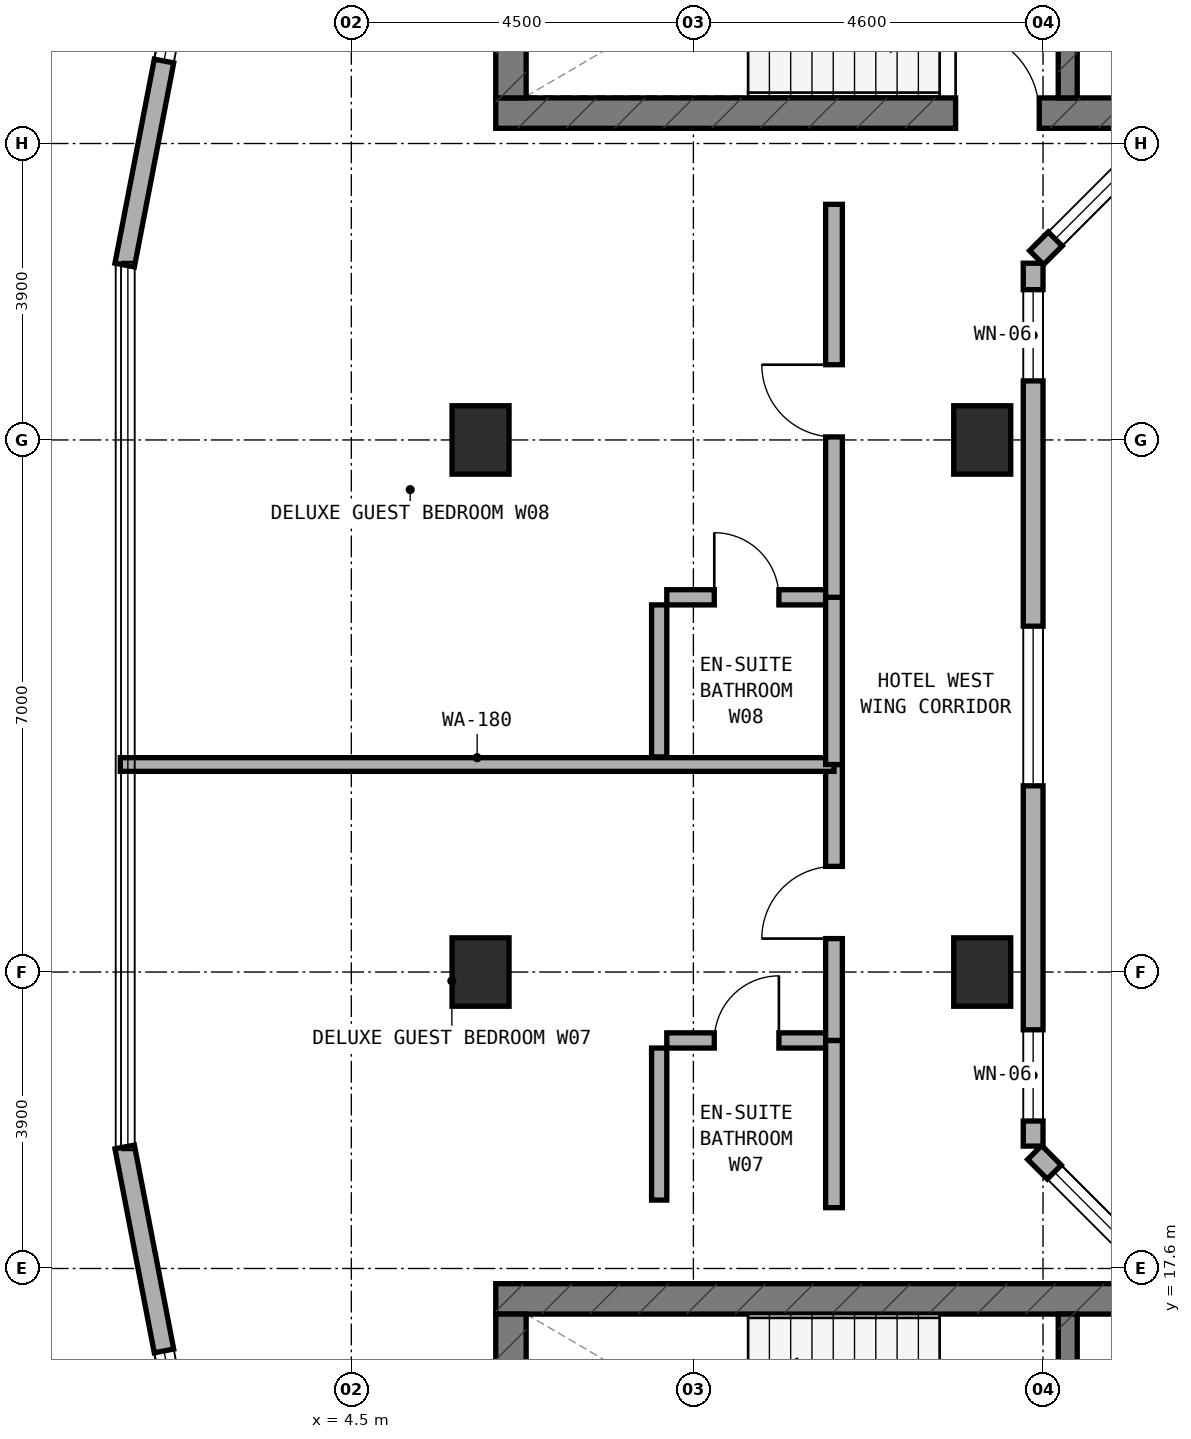
"""IFC4 building model, lengths in metres.
Left out: names, types, materials, properties, quantities, classifications, styles, units other than length and angle.
Written with IfcOpenShell. Run it as: python <this file> out.ifc"""

import sys

from ifc_helpers import new_model, si_unit, direction, frame, frame_2d, origin, origin_2d, place, context, subcontext, project, spatial, rectangle, extrude, element, fill, save


model = new_model("IFC4")
c1 = context("Model", 3, precision=1e-05, world=origin(), true_north=direction((0.0, 1.0)))
c2 = subcontext(c1, "Body", "Model", "MODEL_VIEW")
j1 = project(units=[si_unit("LENGTHUNIT", "METRE"), si_unit("PLANEANGLEUNIT", "RADIAN")], contexts=[c1])
p1 = place(None, origin())
s1 = spatial("IfcSite", under=j1, at=p1, CompositionType="ELEMENT")
p2 = place(p1, origin())
s2 = spatial("IfcBuilding", under=s1, at=p2, CompositionType="ELEMENT")
p3 = place(p2, frame((0.0, 0.0, 181.1)))
s3 = spatial("IfcBuildingStorey", under=s2, at=p3, CompositionType="ELEMENT", Elevation=181.1)
p4 = place(p3, frame((6.4, 32.8, 0.0), z_axis=(0.0, 0.0, 1.0), x_axis=(1.0, 0.0, 0.0)))
e1 = element("IfcWall", 1, at=p4, inside=s3, PredefinedType="SHEAR", context=c2, shape_type="SweptSolid", body=[
    extrude(rectangle(XDim=24.4, YDim=0.4, at=frame_2d((12.2, 0.0))), origin(), (0.0, 0.0, 1.0), 3.6),
])
p5 = place(p4, frame((6.05, 0.0, 0.0)))
e2 = element("IfcOpeningElement", 2, at=p5, cuts=e1, PredefinedType="OPENING", context=c2, shape_type="SweptSolid", body=[
    extrude(rectangle(XDim=1.1, YDim=2.15, at=frame_2d((0.55, 1.075))), frame((0.0, 0.21, 0.0), z_axis=(0.0, -1.0, 0.0), x_axis=(1.0, 0.0, 0.0)), (0.0, 0.0, 1.0), 0.42),
])
p6 = place(p3, frame((6.6, 33.0, 0.0), z_axis=(0.0, 0.0, 1.0), x_axis=(0.0, 1.0, 0.0)))
e3 = element("IfcWall", 3, at=p6, inside=s3, PredefinedType="SHEAR", context=c2, shape_type="SweptSolid", body=[
    extrude(rectangle(XDim=3.16, YDim=0.4, at=frame_2d((1.58, 0.0))), origin(), (0.0, 0.0, 1.0), 3.6),
])
p7 = place(p3, frame((13.925, 33.0, 0.0), z_axis=(0.0, 0.0, 1.0), x_axis=(0.0, 1.0, 0.0)))
e4 = element("IfcWall", 4, at=p7, inside=s3, PredefinedType="STANDARD", context=c2, shape_type="SweptSolid", body=[
    extrude(rectangle(XDim=3.16, YDim=0.25, at=frame_2d((1.58, 0.0))), origin(), (0.0, 0.0, 1.0), 3.32),
])
p8 = place(p7, frame((0.98, 0.0, 0.0)))
e5 = element("IfcOpeningElement", 5, at=p8, cuts=e4, PredefinedType="OPENING", context=c2, shape_type="SweptSolid", body=[
    extrude(rectangle(XDim=1.1, YDim=2.15, at=frame_2d((0.55, 1.075))), frame((0.0, 0.135, 0.0), z_axis=(0.0, -1.0, 0.0), x_axis=(1.0, 0.0, 0.0)), (0.0, 0.0, 1.0), 0.27),
])
p9 = place(p3, frame((6.4, 17.2, 0.0), z_axis=(0.0, 0.0, 1.0), x_axis=(1.0, 0.0, 0.0)))
e6 = element("IfcWall", 6, at=p9, inside=s3, PredefinedType="SHEAR", context=c2, shape_type="SweptSolid", body=[
    extrude(rectangle(XDim=24.4, YDim=0.4, at=frame_2d((12.2, 0.0))), origin(), (0.0, 0.0, 1.0), 3.6),
])
p10 = place(p3, frame((6.6, 13.84, 0.0), z_axis=(0.0, 0.0, 1.0), x_axis=(0.0, 1.0, 0.0)))
e7 = element("IfcWall", 7, at=p10, inside=s3, PredefinedType="SHEAR", context=c2, shape_type="SweptSolid", body=[
    extrude(rectangle(XDim=3.16, YDim=0.4, at=frame_2d((1.58, 0.0))), origin(), (0.0, 0.0, 1.0), 3.6),
])
p11 = place(p3, frame((13.925, 13.84, 0.0), z_axis=(0.0, 0.0, 1.0), x_axis=(0.0, 1.0, 0.0)))
e8 = element("IfcWall", 8, at=p11, inside=s3, PredefinedType="STANDARD", context=c2, shape_type="SweptSolid", body=[
    extrude(rectangle(XDim=3.16, YDim=0.25, at=frame_2d((1.58, 0.0))), origin(), (0.0, 0.0, 1.0), 3.32),
])
p12 = place(p11, frame((0.98, 0.0, 0.0)))
e9 = element("IfcOpeningElement", 9, at=p12, cuts=e8, PredefinedType="OPENING", context=c2, shape_type="SweptSolid", body=[
    extrude(rectangle(XDim=1.1, YDim=2.15, at=frame_2d((0.55, 1.075))), frame((0.0, 0.135, 0.0), z_axis=(0.0, -1.0, 0.0), x_axis=(1.0, 0.0, 0.0)), (0.0, 0.0, 1.0), 0.27),
])
for number, where, z_axis, x_axis in (
    (10, (6.2, 21.5, 0.0), (0.0, 0.0, 1.0), (1.0, 0.0, 0.0)),
    (11, (6.2, 28.5, 0.0), (0.0, 0.0, 1.0), (1.0, 0.0, 0.0)),
    (12, (12.8, 21.5, 0.0), (0.0, 0.0, 1.0), (1.0, 0.0, 0.0)),
    (13, (12.8, 28.5, 0.0), (0.0, 0.0, 1.0), (1.0, 0.0, 0.0)),
):
    element("IfcColumn", number, at=place(p3, frame(where, z_axis=z_axis, x_axis=x_axis)), inside=s3, PredefinedType="COLUMN", context=c2, shape_type="SweptSolid", body=[
        extrude(rectangle(XDim=0.75, YDim=0.9, at=origin_2d()), origin(), (0.0, 0.0, 1.0), 3.6),
    ])
p13 = place(p3, frame((15.278, 17.338, 0.0), z_axis=(0.0, 0.0, 1.0), x_axis=(-0.707106781187, 0.707106781187, 0.0)))
e14 = element("IfcWall", 14, at=p13, inside=s3, PredefinedType="STANDARD", context=c2, shape_type="SweptSolid", body=[
    extrude(rectangle(XDim=2.529, YDim=0.26, at=frame_2d((1.264, 0.0))), origin(), (0.0, 0.0, 1.0), 3.32),
])
p14 = place(p13, frame((0.364, 0.0, 0.85)))
e15 = element("IfcOpeningElement", 15, at=p14, cuts=e14, PredefinedType="OPENING", context=c2, shape_type="SweptSolid", body=[
    extrude(rectangle(XDim=1.8, YDim=1.5, at=frame_2d((0.9, 0.75))), frame((0.0, 0.14, 0.0), z_axis=(0.0, -1.0, 0.0), x_axis=(1.0, 0.0, 0.0)), (0.0, 0.0, 1.0), 0.28),
])
p15 = place(p3, frame((13.47, 19.21, 0.0), z_axis=(0.0, 0.0, 1.0), x_axis=(0.0, 1.0, 0.0)))
e16 = element("IfcWall", 16, at=p15, inside=s3, PredefinedType="STANDARD", context=c2, shape_type="SweptSolid", body=[
    extrude(rectangle(XDim=11.615, YDim=0.26, at=frame_2d((5.808, 0.0))), origin(), (0.0, 0.0, 1.0), 3.32),
])
p16 = place(p15, frame((0.33, 0.0, 0.5)))
e17 = element("IfcOpeningElement", 17, at=p16, cuts=e16, PredefinedType="OPENING", context=c2, shape_type="SweptSolid", body=[
    extrude(rectangle(XDim=1.2, YDim=1.9, at=frame_2d((0.6, 0.95))), frame((0.0, 0.14, 0.0), z_axis=(0.0, -1.0, 0.0), x_axis=(1.0, 0.0, 0.0)), (0.0, 0.0, 1.0), 0.28),
])
p17 = place(p15, frame((4.74, 0.0, 0.85)))
e18 = element("IfcOpeningElement", 18, at=p17, cuts=e16, PredefinedType="OPENING", context=c2, shape_type="SweptSolid", body=[
    extrude(rectangle(XDim=2.1, YDim=1.5, at=frame_2d((1.05, 0.75))), frame((0.0, 0.14, 0.0), z_axis=(0.0, -1.0, 0.0), x_axis=(1.0, 0.0, 0.0)), (0.0, 0.0, 1.0), 0.28),
])
p18 = place(p15, frame((10.067, 0.0, 0.5)))
e19 = element("IfcOpeningElement", 19, at=p18, cuts=e16, PredefinedType="OPENING", context=c2, shape_type="SweptSolid", body=[
    extrude(rectangle(XDim=1.2, YDim=1.9, at=frame_2d((0.6, 0.95))), frame((0.0, 0.14, 0.0), z_axis=(0.0, -1.0, 0.0), x_axis=(1.0, 0.0, 0.0)), (0.0, 0.0, 1.0), 0.28),
])
p19 = place(p3, frame((13.515, 30.899, 0.0), z_axis=(0.0, 0.0, 1.0), x_axis=(0.707106781187, 0.707106781187, 0.0)))
e20 = element("IfcWall", 20, at=p19, inside=s3, PredefinedType="STANDARD", context=c2, shape_type="SweptSolid", body=[
    extrude(rectangle(XDim=2.493, YDim=0.26, at=frame_2d((1.247, 0.0))), origin(), (0.0, 0.0, 1.0), 3.32),
])
p20 = place(p19, frame((0.347, 0.0, 0.85)))
e21 = element("IfcOpeningElement", 21, at=p20, cuts=e20, PredefinedType="OPENING", context=c2, shape_type="SweptSolid", body=[
    extrude(rectangle(XDim=1.8, YDim=1.5, at=frame_2d((0.9, 0.75))), frame((0.0, 0.14, 0.0), z_axis=(0.0, -1.0, 0.0), x_axis=(1.0, 0.0, 0.0)), (0.0, 0.0, 1.0), 0.28),
])
p21 = place(p3, frame((3.23, 39.683, 0.0), z_axis=(0.0, 0.0, 1.0), x_axis=(-0.189254809039, -0.98192801022, 0.0)))
e22 = element("IfcWall", 22, at=p21, inside=s3, PredefinedType="STANDARD", context=c2, shape_type="SweptSolid", body=[
    extrude(rectangle(XDim=9.046, YDim=0.26, at=frame_2d((4.523, 0.0))), origin(), (0.0, 0.0, 1.0), 3.32),
])
p22 = place(p21, frame((4.212, 0.0, 0.85)))
e23 = element("IfcOpeningElement", 23, at=p22, cuts=e22, PredefinedType="OPENING", context=c2, shape_type="SweptSolid", body=[
    extrude(rectangle(XDim=2.1, YDim=1.5, at=frame_2d((1.05, 0.75))), frame((0.0, 0.14, 0.0), z_axis=(0.0, -1.0, 0.0), x_axis=(1.0, 0.0, 0.0)), (0.0, 0.0, 1.0), 0.28),
])
p23 = place(p3, frame((1.518, 19.199, 0.0), z_axis=(0.0, 0.0, 1.0), x_axis=(0.189254809039, -0.98192801022, 0.0)))
e24 = element("IfcWall", 24, at=p23, inside=s3, PredefinedType="STANDARD", context=c2, shape_type="SweptSolid", body=[
    extrude(rectangle(XDim=9.046, YDim=0.26, at=frame_2d((4.523, 0.0))), origin(), (0.0, 0.0, 1.0), 3.32),
])
p24 = place(p23, frame((2.733, 0.0, 0.85)))
e25 = element("IfcOpeningElement", 25, at=p24, cuts=e24, PredefinedType="OPENING", context=c2, shape_type="SweptSolid", body=[
    extrude(rectangle(XDim=2.1, YDim=1.5, at=frame_2d((1.05, 0.75))), frame((0.0, 0.14, 0.0), z_axis=(0.0, -1.0, 0.0), x_axis=(1.0, 0.0, 0.0)), (0.0, 0.0, 1.0), 0.28),
])
p25 = place(p3, frame((8.65, 20.6, 0.0), z_axis=(0.0, 0.0, 1.0), x_axis=(1.0, 0.0, 0.0)))
e26 = element("IfcWall", 26, at=p25, inside=s3, PredefinedType="PLUMBINGWALL", context=c2, shape_type="SweptSolid", body=[
    extrude(rectangle(XDim=2.1, YDim=0.2, at=frame_2d((1.05, 0.0))), origin(), (0.0, 0.0, 1.0), 3.32),
])
p26 = place(p25, frame((0.625, 0.0, 0.0)))
e27 = element("IfcOpeningElement", 27, at=p26, cuts=e26, PredefinedType="OPENING", context=c2, shape_type="SweptSolid", body=[
    extrude(rectangle(XDim=0.85, YDim=2.1, at=frame_2d((0.425, 1.05))), frame((0.0, 0.11, 0.0), z_axis=(0.0, -1.0, 0.0), x_axis=(1.0, 0.0, 0.0)), (0.0, 0.0, 1.0), 0.22),
])
p27 = place(p3, frame((8.55, 18.5, 0.0), z_axis=(0.0, 0.0, 1.0), x_axis=(0.0, 1.0, 0.0)))
e28 = element("IfcWall", 28, at=p27, inside=s3, PredefinedType="PLUMBINGWALL", context=c2, shape_type="SweptSolid", body=[
    extrude(rectangle(XDim=2.0, YDim=0.2, at=frame_2d((1.0, 0.0))), origin(), (0.0, 0.0, 1.0), 3.32),
])
p28 = place(p3, frame((10.85, 18.4, 0.0), z_axis=(0.0, 0.0, 1.0), x_axis=(0.0, 1.0, 0.0)))
e29 = element("IfcWall", 29, at=p28, inside=s3, PredefinedType="SOLIDWALL", context=c2, shape_type="SweptSolid", body=[
    extrude(rectangle(XDim=2.2, YDim=0.22, at=frame_2d((1.1, 0.0))), origin(), (0.0, 0.0, 1.0), 3.32),
])
p29 = place(p3, frame((10.85, 20.6, 0.0), z_axis=(0.0, 0.0, 1.0), x_axis=(0.0, 1.0, 0.0)))
e30 = element("IfcWall", 30, at=p29, inside=s3, PredefinedType="SOLIDWALL", context=c2, shape_type="SweptSolid", body=[
    extrude(rectangle(XDim=3.63, YDim=0.22, at=frame_2d((1.815, 0.0))), origin(), (0.0, 0.0, 1.0), 2.995),
])
p30 = place(p29, frame((1.34, 0.0, 0.0)))
e31 = element("IfcOpeningElement", 31, at=p30, cuts=e30, PredefinedType="OPENING", context=c2, shape_type="SweptSolid", body=[
    extrude(rectangle(XDim=0.95, YDim=2.1, at=frame_2d((0.475, 1.05))), frame((0.0, 0.12, 0.0), z_axis=(0.0, -1.0, 0.0), x_axis=(1.0, 0.0, 0.0)), (0.0, 0.0, 1.0), 0.24),
])
p31 = place(p3, frame((1.46, 24.23, 0.0), z_axis=(0.0, 0.0, 1.0), x_axis=(1.0, 0.0, 0.0)))
e32 = element("IfcWall", 32, at=p31, inside=s3, PredefinedType="SOLIDWALL", context=c2, shape_type="SweptSolid", body=[
    extrude(rectangle(XDim=9.39, YDim=0.18, at=frame_2d((4.695, 0.0))), origin(), (0.0, 0.0, 1.0), 2.935),
])
p32 = place(p3, frame((8.65, 26.43, 0.0), z_axis=(0.0, 0.0, 1.0), x_axis=(1.0, 0.0, 0.0)))
e33 = element("IfcWall", 33, at=p32, inside=s3, PredefinedType="PLUMBINGWALL", context=c2, shape_type="SweptSolid", body=[
    extrude(rectangle(XDim=2.1, YDim=0.2, at=frame_2d((1.05, 0.0))), origin(), (0.0, 0.0, 1.0), 3.32),
])
p33 = place(p32, frame((0.625, 0.0, 0.0)))
e34 = element("IfcOpeningElement", 34, at=p33, cuts=e33, PredefinedType="OPENING", context=c2, shape_type="SweptSolid", body=[
    extrude(rectangle(XDim=0.85, YDim=2.1, at=frame_2d((0.425, 1.05))), frame((0.0, 0.11, 0.0), z_axis=(0.0, -1.0, 0.0), x_axis=(1.0, 0.0, 0.0)), (0.0, 0.0, 1.0), 0.22),
])
p34 = place(p3, frame((8.55, 24.33, 0.0), z_axis=(0.0, 0.0, 1.0), x_axis=(0.0, 1.0, 0.0)))
e35 = element("IfcWall", 35, at=p34, inside=s3, PredefinedType="PLUMBINGWALL", context=c2, shape_type="SweptSolid", body=[
    extrude(rectangle(XDim=2.0, YDim=0.2, at=frame_2d((1.0, 0.0))), origin(), (0.0, 0.0, 1.0), 3.32),
])
p35 = place(p3, frame((10.85, 24.23, 0.0), z_axis=(0.0, 0.0, 1.0), x_axis=(0.0, 1.0, 0.0)))
e36 = element("IfcWall", 36, at=p35, inside=s3, PredefinedType="SOLIDWALL", context=c2, shape_type="SweptSolid", body=[
    extrude(rectangle(XDim=2.2, YDim=0.22, at=frame_2d((1.1, 0.0))), origin(), (0.0, 0.0, 1.0), 3.32),
])
p36 = place(p3, frame((10.85, 26.43, 0.0), z_axis=(0.0, 0.0, 1.0), x_axis=(0.0, 1.0, 0.0)))
e37 = element("IfcWall", 37, at=p36, inside=s3, PredefinedType="SOLIDWALL", context=c2, shape_type="SweptSolid", body=[
    extrude(rectangle(XDim=5.17, YDim=0.22, at=frame_2d((2.585, 0.0))), origin(), (0.0, 0.0, 1.0), 2.995),
])
p37 = place(p36, frame((2.11, 0.0, 0.0)))
e38 = element("IfcOpeningElement", 38, at=p37, cuts=e37, PredefinedType="OPENING", context=c2, shape_type="SweptSolid", body=[
    extrude(rectangle(XDim=0.95, YDim=2.1, at=frame_2d((0.475, 1.05))), frame((0.0, 0.12, 0.0), z_axis=(0.0, -1.0, 0.0), x_axis=(1.0, 0.0, 0.0)), (0.0, 0.0, 1.0), 0.24),
])
p38 = place(p14, origin())
e39 = element("IfcWindow", 39, at=p38, inside=s3, PartitioningType="SINGLE_PANEL", PredefinedType="WINDOW", context=c2, shape_type="SweptSolid", body=[
    extrude(rectangle(XDim=1.8, YDim=1.5, at=frame_2d((0.9, 0.75))), frame((0.0, 0.03, 0.0), z_axis=(0.0, -1.0, 0.0), x_axis=(1.0, 0.0, 0.0)), (0.0, 0.0, 1.0), 0.06),
])
fill(e15, e39)
p39 = place(p16, origin())
e40 = element("IfcWindow", 40, at=p39, inside=s3, PartitioningType="SINGLE_PANEL", PredefinedType="WINDOW", context=c2, shape_type="SweptSolid", body=[
    extrude(rectangle(XDim=1.2, YDim=1.9, at=frame_2d((0.6, 0.95))), frame((0.0, 0.03, 0.0), z_axis=(0.0, -1.0, 0.0), x_axis=(1.0, 0.0, 0.0)), (0.0, 0.0, 1.0), 0.06),
])
fill(e17, e40)
p40 = place(p17, origin())
e41 = element("IfcWindow", 41, at=p40, inside=s3, PartitioningType="SINGLE_PANEL", PredefinedType="WINDOW", context=c2, shape_type="SweptSolid", body=[
    extrude(rectangle(XDim=2.1, YDim=1.5, at=frame_2d((1.05, 0.75))), frame((0.0, 0.03, 0.0), z_axis=(0.0, -1.0, 0.0), x_axis=(1.0, 0.0, 0.0)), (0.0, 0.0, 1.0), 0.06),
])
fill(e18, e41)
p41 = place(p18, origin())
e42 = element("IfcWindow", 42, at=p41, inside=s3, PartitioningType="SINGLE_PANEL", PredefinedType="WINDOW", context=c2, shape_type="SweptSolid", body=[
    extrude(rectangle(XDim=1.2, YDim=1.9, at=frame_2d((0.6, 0.95))), frame((0.0, 0.03, 0.0), z_axis=(0.0, -1.0, 0.0), x_axis=(1.0, 0.0, 0.0)), (0.0, 0.0, 1.0), 0.06),
])
fill(e19, e42)
p42 = place(p20, origin())
e43 = element("IfcWindow", 43, at=p42, inside=s3, PartitioningType="SINGLE_PANEL", PredefinedType="WINDOW", context=c2, shape_type="SweptSolid", body=[
    extrude(rectangle(XDim=1.8, YDim=1.5, at=frame_2d((0.9, 0.75))), frame((0.0, 0.03, 0.0), z_axis=(0.0, -1.0, 0.0), x_axis=(1.0, 0.0, 0.0)), (0.0, 0.0, 1.0), 0.06),
])
fill(e21, e43)
p43 = place(p22, origin())
e44 = element("IfcWindow", 44, at=p43, inside=s3, PartitioningType="SINGLE_PANEL", PredefinedType="WINDOW", context=c2, shape_type="SweptSolid", body=[
    extrude(rectangle(XDim=2.1, YDim=1.5, at=frame_2d((1.05, 0.75))), frame((0.0, 0.03, 0.0), z_axis=(0.0, -1.0, 0.0), x_axis=(1.0, 0.0, 0.0)), (0.0, 0.0, 1.0), 0.06),
])
fill(e23, e44)
p44 = place(p24, origin())
e45 = element("IfcWindow", 45, at=p44, inside=s3, PartitioningType="SINGLE_PANEL", PredefinedType="WINDOW", context=c2, shape_type="SweptSolid", body=[
    extrude(rectangle(XDim=2.1, YDim=1.5, at=frame_2d((1.05, 0.75))), frame((0.0, 0.03, 0.0), z_axis=(0.0, -1.0, 0.0), x_axis=(1.0, 0.0, 0.0)), (0.0, 0.0, 1.0), 0.06),
])
fill(e25, e45)
p45 = place(p5, origin())
e46 = element("IfcDoor", 46, at=p45, inside=s3, OperationType="SINGLE_SWING_LEFT", PredefinedType="DOOR", context=c2, shape_type="SweptSolid", body=[
    extrude(rectangle(XDim=1.1, YDim=2.15, at=frame_2d((0.55, 1.075))), frame((0.0, 0.025, 0.0), z_axis=(0.0, -1.0, 0.0), x_axis=(1.0, 0.0, 0.0)), (0.0, 0.0, 1.0), 0.05),
])
fill(e2, e46)
p46 = place(p26, origin())
e47 = element("IfcDoor", 47, at=p46, inside=s3, OperationType="SINGLE_SWING_RIGHT", PredefinedType="DOOR", context=c2, shape_type="SweptSolid", body=[
    extrude(rectangle(XDim=0.85, YDim=2.1, at=frame_2d((0.425, 1.05))), frame((0.0, 0.025, 0.0), z_axis=(0.0, -1.0, 0.0), x_axis=(1.0, 0.0, 0.0)), (0.0, 0.0, 1.0), 0.05),
])
fill(e27, e47)
p47 = place(p30, origin())
e48 = element("IfcDoor", 48, at=p47, inside=s3, OperationType="SINGLE_SWING_LEFT", PredefinedType="DOOR", context=c2, shape_type="SweptSolid", body=[
    extrude(rectangle(XDim=0.95, YDim=2.1, at=frame_2d((0.475, 1.05))), frame((0.0, 0.025, 0.0), z_axis=(0.0, -1.0, 0.0), x_axis=(1.0, 0.0, 0.0)), (0.0, 0.0, 1.0), 0.05),
])
fill(e31, e48)
p48 = place(p33, origin())
e49 = element("IfcDoor", 49, at=p48, inside=s3, OperationType="SINGLE_SWING_LEFT", PredefinedType="DOOR", context=c2, shape_type="SweptSolid", body=[
    extrude(rectangle(XDim=0.85, YDim=2.1, at=frame_2d((0.425, 1.05))), frame((0.0, 0.025, 0.0), z_axis=(0.0, -1.0, 0.0), x_axis=(1.0, 0.0, 0.0)), (0.0, 0.0, 1.0), 0.05),
])
fill(e34, e49)
p49 = place(p37, origin())
e50 = element("IfcDoor", 50, at=p49, inside=s3, OperationType="SINGLE_SWING_RIGHT", PredefinedType="DOOR", context=c2, shape_type="SweptSolid", body=[
    extrude(rectangle(XDim=0.95, YDim=2.1, at=frame_2d((0.475, 1.05))), frame((0.0, 0.025, 0.0), z_axis=(0.0, -1.0, 0.0), x_axis=(1.0, 0.0, 0.0)), (0.0, 0.0, 1.0), 0.05),
])
fill(e38, e50)
save(model, sys.argv[1])
